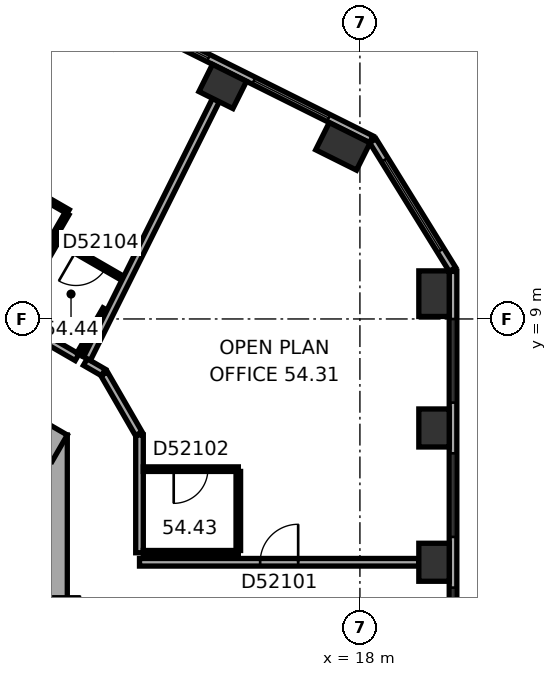
"""IFC4 building model, lengths in metres.
Left out: names, types, materials, properties, quantities, classifications, styles, units other than length and angle.
Written with IfcOpenShell. Run it as: python <this file> out.ifc"""

import sys

from ifc_helpers import new_model, si_unit, direction, frame, frame_2d, origin, origin_2d, place, context, subcontext, project, spatial, rectangle, extrude, element, fill, save


model = new_model("IFC4")
c1 = context("Model", 3, precision=1e-05, world=origin(), true_north=direction((0.0, 1.0)))
c2 = subcontext(c1, "Body", "Model", "MODEL_VIEW")
j1 = project(units=[si_unit("LENGTHUNIT", "METRE"), si_unit("PLANEANGLEUNIT", "RADIAN")], contexts=[c1])
p1 = place(None, origin())
s1 = spatial("IfcSite", under=j1, at=p1, CompositionType="ELEMENT")
p2 = place(p1, origin())
s2 = spatial("IfcBuilding", under=s1, at=p2, CompositionType="ELEMENT")
p3 = place(p2, frame((0.0, 0.0, 221.7)))
s3 = spatial("IfcBuildingStorey", under=s2, at=p3, CompositionType="ELEMENT", Elevation=221.7)
for number, where, z_axis, x_axis in (
    (1, (19.95, 2.598, 0.0), (0.0, 0.0, 1.0), (0.0, 1.0, 0.0)),
    (2, (19.95, 6.132, 0.0), (0.0, 0.0, 1.0), (0.0, 1.0, 0.0)),
):
    element("IfcColumn", number, at=place(p3, frame(where, z_axis=z_axis, x_axis=x_axis)), inside=s3, PredefinedType="COLUMN", context=c2, shape_type="SweptSolid", body=[
        extrude(rectangle(XDim=1.0, YDim=0.8, at=origin_2d()), origin(), (0.0, 0.0, 1.0), 3.7),
    ])
for number, where, z_axis, x_axis in (
    (3, (19.95, 9.665, 0.0), (0.0, 0.0, 1.0), (0.0, 1.0, 0.0)),
    (4, (17.552, 13.541, 0.0), (0.0, 0.0, 1.0), (-0.895, 0.446, 0.0)),
):
    element("IfcColumn", number, at=place(p3, frame(where, z_axis=z_axis, x_axis=x_axis)), inside=s3, PredefinedType="COLUMN", context=c2, shape_type="SweptSolid", body=[
        extrude(rectangle(XDim=1.2, YDim=0.8, at=origin_2d()), origin(), (0.0, 0.0, 1.0), 3.7),
    ])
p4 = place(p3, frame((14.389, 15.118, 0.0), z_axis=(0.0, 0.0, 1.0), x_axis=(-0.894934361602, 0.44619781311, 0.0)))
e5 = element("IfcColumn", 5, at=p4, inside=s3, PredefinedType="COLUMN", context=c2, shape_type="SweptSolid", body=[
    extrude(rectangle(XDim=1.0, YDim=0.8, at=origin_2d()), origin(), (0.0, 0.0, 1.0), 3.7),
])
p5 = place(p3, frame((9.9, -5.947, 0.0), z_axis=(0.0, 0.0, 1.0), x_axis=(0.0, 1.0, 0.0)))
e6 = element("IfcWall", 6, at=p5, inside=s3, PredefinedType="SHEAR", context=c2, shape_type="SweptSolid", body=[
    extrude(rectangle(XDim=11.894, YDim=0.8, at=frame_2d((5.947, 0.0))), origin(), (0.0, 0.0, 1.0), 3.7),
])
p6 = place(p5, frame((6.147, 0.0, 0.0)))
e7 = element("IfcOpeningElement", 7, at=p6, cuts=e6, PredefinedType="OPENING", context=c2, shape_type="SweptSolid", body=[
    extrude(rectangle(XDim=1.5, YDim=2.1, at=frame_2d((0.75, 1.05))), frame((0.0, 0.41, 0.0), z_axis=(0.0, -1.0, 0.0), x_axis=(1.0, 0.0, 0.0)), (0.0, 0.0, 1.0), 0.82),
])
p7 = place(p5, frame((2.997, 0.0, 0.0)))
e8 = element("IfcOpeningElement", 8, at=p7, cuts=e6, PredefinedType="OPENING", context=c2, shape_type="SweptSolid", body=[
    extrude(rectangle(XDim=0.9, YDim=2.1, at=frame_2d((0.45, 1.05))), frame((0.0, 0.41, 0.0), z_axis=(0.0, -1.0, 0.0), x_axis=(1.0, 0.0, 0.0)), (0.0, 0.0, 1.0), 0.82),
])
p8 = place(p3, frame((10.1, 5.6, 0.0), z_axis=(0.0, 0.0, 1.0), x_axis=(-0.866023897231, 0.500002609418, 0.0)))
e9 = element("IfcWall", 9, at=p8, inside=s3, PredefinedType="SHEAR", context=c2, shape_type="SweptSolid", body=[
    extrude(rectangle(XDim=11.894, YDim=0.8, at=frame_2d((5.947, 0.0))), origin(), (0.0, 0.0, 1.0), 3.7),
])
p9 = place(p8, frame((3.897, 0.0, 0.0)))
e10 = element("IfcOpeningElement", 10, at=p9, cuts=e9, PredefinedType="OPENING", context=c2, shape_type="SweptSolid", body=[
    extrude(rectangle(XDim=0.9, YDim=2.1, at=frame_2d((0.45, 1.05))), frame((0.0, 0.41, 0.0), z_axis=(0.0, -1.0, 0.0), x_axis=(1.0, 0.0, 0.0)), (0.0, 0.0, 1.0), 0.82),
])
p10 = place(p8, frame((7.797, 0.0, 0.0)))
e11 = element("IfcOpeningElement", 11, at=p10, cuts=e9, PredefinedType="OPENING", context=c2, shape_type="SweptSolid", body=[
    extrude(rectangle(XDim=0.9, YDim=2.1, at=frame_2d((0.45, 1.05))), frame((0.0, 0.41, 0.0), z_axis=(0.0, -1.0, 0.0), x_axis=(1.0, 0.0, 0.0)), (0.0, 0.0, 1.0), 0.82),
])
p11 = place(p3, frame((20.45, -8.59, 0.0), z_axis=(0.0, 0.0, 1.0), x_axis=(0.0, 1.0, 0.0)))
e12 = element("IfcWall", 12, at=p11, inside=s3, PredefinedType="STANDARD", context=c2, shape_type="SweptSolid", body=[
    extrude(rectangle(XDim=18.841, YDim=0.2, at=frame_2d((9.421, 0.0))), origin(), (0.0, 0.0, 1.0), 3.7),
])
p12 = place(p11, frame((1.254, 0.0, 0.9)))
e13 = element("IfcOpeningElement", 13, at=p12, cuts=e12, PredefinedType="OPENING", context=c2, shape_type="SweptSolid", body=[
    extrude(rectangle(XDim=2.2, YDim=2.0, at=frame_2d((1.1, 1.0))), frame((0.0, 0.11, 0.0), z_axis=(0.0, -1.0, 0.0), x_axis=(1.0, 0.0, 0.0)), (0.0, 0.0, 1.0), 0.22),
])
p13 = place(p11, frame((4.788, 0.0, 0.9)))
e14 = element("IfcOpeningElement", 14, at=p13, cuts=e12, PredefinedType="OPENING", context=c2, shape_type="SweptSolid", body=[
    extrude(rectangle(XDim=2.2, YDim=2.0, at=frame_2d((1.1, 1.0))), frame((0.0, 0.11, 0.0), z_axis=(0.0, -1.0, 0.0), x_axis=(1.0, 0.0, 0.0)), (0.0, 0.0, 1.0), 0.22),
])
p14 = place(p11, frame((8.322, 0.0, 0.9)))
e15 = element("IfcOpeningElement", 15, at=p14, cuts=e12, PredefinedType="OPENING", context=c2, shape_type="SweptSolid", body=[
    extrude(rectangle(XDim=2.2, YDim=2.0, at=frame_2d((1.1, 1.0))), frame((0.0, 0.11, 0.0), z_axis=(0.0, -1.0, 0.0), x_axis=(1.0, 0.0, 0.0)), (0.0, 0.0, 1.0), 0.22),
])
p15 = place(p11, frame((11.855, 0.0, 0.9)))
e16 = element("IfcOpeningElement", 16, at=p15, cuts=e12, PredefinedType="OPENING", context=c2, shape_type="SweptSolid", body=[
    extrude(rectangle(XDim=2.2, YDim=2.0, at=frame_2d((1.1, 1.0))), frame((0.0, 0.11, 0.0), z_axis=(0.0, -1.0, 0.0), x_axis=(1.0, 0.0, 0.0)), (0.0, 0.0, 1.0), 0.22),
])
p16 = place(p11, frame((15.389, 0.0, 0.9)))
e17 = element("IfcOpeningElement", 17, at=p16, cuts=e12, PredefinedType="OPENING", context=c2, shape_type="SweptSolid", body=[
    extrude(rectangle(XDim=2.2, YDim=2.0, at=frame_2d((1.1, 1.0))), frame((0.0, 0.11, 0.0), z_axis=(0.0, -1.0, 0.0), x_axis=(1.0, 0.0, 0.0)), (0.0, 0.0, 1.0), 0.22),
])
p17 = place(p3, frame((20.435, 10.304, 0.0), z_axis=(0.0, 0.0, 1.0), x_axis=(-0.526202661606, 0.850359194058, 0.0)))
e18 = element("IfcWall", 18, at=p17, inside=s3, PredefinedType="STANDARD", context=c2, shape_type="SweptSolid", body=[
    extrude(rectangle(XDim=3.983, YDim=0.2, at=frame_2d((1.991, 0.0))), origin(), (0.0, 0.0, 1.0), 3.7),
])
p18 = place(p17, frame((0.591, 0.0, 0.9)))
e19 = element("IfcOpeningElement", 19, at=p18, cuts=e18, PredefinedType="OPENING", context=c2, shape_type="SweptSolid", body=[
    extrude(rectangle(XDim=2.8, YDim=2.0, at=frame_2d((1.4, 1.0))), frame((0.0, 0.11, 0.0), z_axis=(0.0, -1.0, 0.0), x_axis=(1.0, 0.0, 0.0)), (0.0, 0.0, 1.0), 0.22),
])
p19 = place(p3, frame((18.299, 13.727, 0.0), z_axis=(0.0, 0.0, 1.0), x_axis=(-0.894934554817, 0.44619742558, 0.0)))
e20 = element("IfcWall", 20, at=p19, inside=s3, PredefinedType="STANDARD", context=c2, shape_type="SweptSolid", body=[
    extrude(rectangle(XDim=18.841, YDim=0.2, at=frame_2d((9.421, 0.0))), origin(), (0.0, 0.0, 1.0), 3.7),
])
p20 = place(p19, frame((1.253, 0.0, 0.9)))
e21 = element("IfcOpeningElement", 21, at=p20, cuts=e20, PredefinedType="OPENING", context=c2, shape_type="SweptSolid", body=[
    extrude(rectangle(XDim=2.2, YDim=2.0, at=frame_2d((1.1, 1.0))), frame((0.0, 0.11, 0.0), z_axis=(0.0, -1.0, 0.0), x_axis=(1.0, 0.0, 0.0)), (0.0, 0.0, 1.0), 0.22),
])
p21 = place(p19, frame((4.786, 0.0, 0.9)))
e22 = element("IfcOpeningElement", 22, at=p21, cuts=e20, PredefinedType="OPENING", context=c2, shape_type="SweptSolid", body=[
    extrude(rectangle(XDim=2.2, YDim=2.0, at=frame_2d((1.1, 1.0))), frame((0.0, 0.11, 0.0), z_axis=(0.0, -1.0, 0.0), x_axis=(1.0, 0.0, 0.0)), (0.0, 0.0, 1.0), 0.22),
])
p22 = place(p19, frame((8.32, 0.0, 0.9)))
e23 = element("IfcOpeningElement", 23, at=p22, cuts=e20, PredefinedType="OPENING", context=c2, shape_type="SweptSolid", body=[
    extrude(rectangle(XDim=2.2, YDim=2.0, at=frame_2d((1.1, 1.0))), frame((0.0, 0.11, 0.0), z_axis=(0.0, -1.0, 0.0), x_axis=(1.0, 0.0, 0.0)), (0.0, 0.0, 1.0), 0.22),
])
p23 = place(p19, frame((11.854, 0.0, 0.9)))
e24 = element("IfcOpeningElement", 24, at=p23, cuts=e20, PredefinedType="OPENING", context=c2, shape_type="SweptSolid", body=[
    extrude(rectangle(XDim=2.2, YDim=2.0, at=frame_2d((1.1, 1.0))), frame((0.0, 0.11, 0.0), z_axis=(0.0, -1.0, 0.0), x_axis=(1.0, 0.0, 0.0)), (0.0, 0.0, 1.0), 0.22),
])
p24 = place(p19, frame((15.387, 0.0, 0.9)))
e25 = element("IfcOpeningElement", 25, at=p24, cuts=e20, PredefinedType="OPENING", context=c2, shape_type="SweptSolid", body=[
    extrude(rectangle(XDim=2.2, YDim=2.0, at=frame_2d((1.1, 1.0))), frame((0.0, 0.11, 0.0), z_axis=(0.0, -1.0, 0.0), x_axis=(1.0, 0.0, 0.0)), (0.0, 0.0, 1.0), 0.22),
])
p25 = place(p3, frame((7.948, 13.193, 0.0), z_axis=(0.0, 0.0, 1.0), x_axis=(0.866019409031, -0.500010383074, 0.0)))
e26 = element("IfcWall", 26, at=p25, inside=s3, PredefinedType="PARTITIONING", context=c2, shape_type="SweptSolid", body=[
    extrude(rectangle(XDim=2.74, YDim=0.12, at=frame_2d((1.37, 0.0))), origin(), (0.0, 0.0, 1.0), 3.42),
])
p26 = place(p3, frame((8.875, 9.079, 0.0), z_axis=(0.0, 0.0, 1.0), x_axis=(0.499998129301, 0.86602648383, 0.0)))
e27 = element("IfcWall", 27, at=p26, inside=s3, PredefinedType="PARTITIONING", context=c2, shape_type="SweptSolid", body=[
    extrude(rectangle(XDim=2.3, YDim=0.12, at=frame_2d((1.15, 0.0))), origin(), (0.0, 0.0, 1.0), 3.42),
])
p27 = place(p3, frame((10.077, 11.04, 0.0), z_axis=(0.0, 0.0, 1.0), x_axis=(0.866043088465, -0.499969367985, 0.0)))
e28 = element("IfcWall", 28, at=p27, inside=s3, PredefinedType="PARTITIONING", context=c2, shape_type="SweptSolid", body=[
    extrude(rectangle(XDim=1.94, YDim=0.12, at=frame_2d((0.97, 0.0))), origin(), (0.0, 0.0, 1.0), 3.42),
])
p28 = place(p27, frame((0.52, 0.0, 0.0)))
e29 = element("IfcOpeningElement", 29, at=p28, cuts=e28, PredefinedType="OPENING", context=c2, shape_type="SweptSolid", body=[
    extrude(rectangle(XDim=0.9, YDim=2.1, at=frame_2d((0.45, 1.05))), frame((0.0, 0.07, 0.0), z_axis=(0.0, -1.0, 0.0), x_axis=(1.0, 0.0, 0.0)), (0.0, 0.0, 1.0), 0.14),
])
p29 = place(p3, frame((10.292, 11.771, 0.0), z_axis=(0.0, 0.0, 1.0), x_axis=(-0.500026023896, -0.86601037836, 0.0)))
e30 = element("IfcWall", 30, at=p29, inside=s3, PredefinedType="PARTITIONING", context=c2, shape_type="SweptSolid", body=[
    extrude(rectangle(XDim=3.04, YDim=0.12, at=frame_2d((1.52, 0.0))), origin(), (0.0, 0.0, 1.0), 3.42),
])
p30 = place(p3, frame((10.558, 7.992, 0.0), z_axis=(0.0, 0.0, 1.0), x_axis=(-0.866041268327, 0.499972520799, 0.0)))
e31 = element("IfcWall", 31, at=p30, inside=s3, PredefinedType="PARTITIONING", context=c2, shape_type="SweptSolid", body=[
    extrude(rectangle(XDim=2.0, YDim=0.2, at=frame_2d((1.0, 0.0))), origin(), (0.0, 0.0, 1.0), 3.42),
])
p31 = place(p3, frame((11.25, 7.592, 0.0), z_axis=(0.0, 0.0, 1.0), x_axis=(-0.865993292597, 0.500055614084, 0.0)))
e32 = element("IfcWall", 32, at=p31, inside=s3, PredefinedType="PARTITIONING", context=c2, shape_type="SweptSolid", body=[
    extrude(rectangle(XDim=0.55, YDim=0.2, at=frame_2d((0.275, 0.0))), origin(), (0.0, 0.0, 1.0), 3.42),
])
p32 = place(p3, frame((11.291, 9.263, 0.0), z_axis=(0.0, 0.0, 1.0), x_axis=(-0.500036664704, -0.866004234373, 0.0)))
e33 = element("IfcWall", 33, at=p32, inside=s3, PredefinedType="PARTITIONING", context=c2, shape_type="SweptSolid", body=[
    extrude(rectangle(XDim=1.368, YDim=0.12, at=frame_2d((0.684, 0.0))), origin(), (0.0, 0.0, 1.0), 3.42),
])
p33 = place(p3, frame((12.18, 5.981, 0.0), z_axis=(0.0, 0.0, 1.0), x_axis=(-0.499904359745, 0.86608061467, 0.0)))
e34 = element("IfcWall", 34, at=p33, inside=s3, PredefinedType="PARTITIONING", context=c2, shape_type="SweptSolid", body=[
    extrude(rectangle(XDim=1.82, YDim=0.2, at=frame_2d((0.91, 0.0))), origin(), (0.0, 0.0, 1.0), 3.42),
])
p34 = place(p3, frame((12.2, 2.848, 0.0), z_axis=(0.0, 0.0, 1.0), x_axis=(0.0, 1.0, 0.0)))
e35 = element("IfcWall", 35, at=p34, inside=s3, PredefinedType="PARTITIONING", context=c2, shape_type="SweptSolid", body=[
    extrude(rectangle(XDim=3.099, YDim=0.2, at=frame_2d((1.549, 0.0))), origin(), (0.0, 0.0, 1.0), 3.42),
])
p35 = place(p3, frame((12.3, 5.048, 0.0), z_axis=(0.0, 0.0, 1.0), x_axis=(1.0, 0.0, 0.0)))
e36 = element("IfcWall", 36, at=p35, inside=s3, PredefinedType="PARTITIONING", context=c2, shape_type="SweptSolid", body=[
    extrude(rectangle(XDim=2.5, YDim=0.12, at=frame_2d((1.25, 0.0))), origin(), (0.0, 0.0, 1.0), 3.42),
])
p36 = place(p35, frame((0.8, 0.0, 0.0)))
e37 = element("IfcOpeningElement", 37, at=p36, cuts=e36, PredefinedType="OPENING", context=c2, shape_type="SweptSolid", body=[
    extrude(rectangle(XDim=0.9, YDim=2.1, at=frame_2d((0.45, 1.05))), frame((0.0, 0.07, 0.0), z_axis=(0.0, -1.0, 0.0), x_axis=(1.0, 0.0, 0.0)), (0.0, 0.0, 1.0), 0.14),
])
p37 = place(p3, frame((14.211, 14.76, 0.0), z_axis=(0.0, 0.0, 1.0), x_axis=(-0.446198490295, -0.89493402397, 0.0)))
e38 = element("IfcWall", 38, at=p37, inside=s3, PredefinedType="PARTITIONING", context=c2, shape_type="SweptSolid", body=[
    extrude(rectangle(XDim=7.602, YDim=0.2, at=frame_2d((3.801, 0.0))), origin(), (0.0, 0.0, 1.0), 3.42),
])
p38 = place(p3, frame((14.8, 2.848, 0.0), z_axis=(0.0, 0.0, 1.0), x_axis=(-1.0, 0.0, 0.0)))
e39 = element("IfcWall", 39, at=p38, inside=s3, PredefinedType="PARTITIONING", context=c2, shape_type="SweptSolid", body=[
    extrude(rectangle(XDim=2.5, YDim=0.12, at=frame_2d((1.25, 0.0))), origin(), (0.0, 0.0, 1.0), 3.42),
])
p39 = place(p3, frame((14.8, 4.988, 0.0), z_axis=(0.0, 0.0, 1.0), x_axis=(0.0, -1.0, 0.0)))
e40 = element("IfcWall", 40, at=p39, inside=s3, PredefinedType="PARTITIONING", context=c2, shape_type="SweptSolid", body=[
    extrude(rectangle(XDim=2.08, YDim=0.12, at=frame_2d((1.04, 0.0))), origin(), (0.0, 0.0, 1.0), 3.42),
])
p40 = place(p3, frame((19.55, 2.598, 0.0), z_axis=(0.0, 0.0, 1.0), x_axis=(-1.0, 0.0, 0.0)))
e41 = element("IfcWall", 41, at=p40, inside=s3, PredefinedType="PARTITIONING", context=c2, shape_type="SweptSolid", body=[
    extrude(rectangle(XDim=7.35, YDim=0.2, at=frame_2d((3.675, 0.0))), origin(), (0.0, 0.0, 1.0), 3.42),
])
p41 = place(p40, frame((3.175, 0.0, 0.0)))
e42 = element("IfcOpeningElement", 42, at=p41, cuts=e41, PredefinedType="OPENING", context=c2, shape_type="SweptSolid", body=[
    extrude(rectangle(XDim=1.0, YDim=2.1, at=frame_2d((0.5, 1.05))), frame((0.0, 0.11, 0.0), z_axis=(0.0, -1.0, 0.0), x_axis=(1.0, 0.0, 0.0)), (0.0, 0.0, 1.0), 0.22),
])
p42 = place(p14, origin())
e43 = element("IfcWindow", 43, at=p42, inside=s3, PartitioningType="SINGLE_PANEL", PredefinedType="WINDOW", context=c2, shape_type="SweptSolid", body=[
    extrude(rectangle(XDim=2.2, YDim=2.0, at=frame_2d((1.1, 1.0))), frame((0.0, 0.03, 0.0), z_axis=(0.0, -1.0, 0.0), x_axis=(1.0, 0.0, 0.0)), (0.0, 0.0, 1.0), 0.06),
])
fill(e15, e43)
p43 = place(p15, origin())
e44 = element("IfcWindow", 44, at=p43, inside=s3, PartitioningType="SINGLE_PANEL", PredefinedType="WINDOW", context=c2, shape_type="SweptSolid", body=[
    extrude(rectangle(XDim=2.2, YDim=2.0, at=frame_2d((1.1, 1.0))), frame((0.0, 0.03, 0.0), z_axis=(0.0, -1.0, 0.0), x_axis=(1.0, 0.0, 0.0)), (0.0, 0.0, 1.0), 0.06),
])
fill(e16, e44)
p44 = place(p16, origin())
e45 = element("IfcWindow", 45, at=p44, inside=s3, PartitioningType="SINGLE_PANEL", PredefinedType="WINDOW", context=c2, shape_type="SweptSolid", body=[
    extrude(rectangle(XDim=2.2, YDim=2.0, at=frame_2d((1.1, 1.0))), frame((0.0, 0.03, 0.0), z_axis=(0.0, -1.0, 0.0), x_axis=(1.0, 0.0, 0.0)), (0.0, 0.0, 1.0), 0.06),
])
fill(e17, e45)
p45 = place(p18, origin())
e46 = element("IfcWindow", 46, at=p45, inside=s3, PartitioningType="SINGLE_PANEL", PredefinedType="WINDOW", context=c2, shape_type="SweptSolid", body=[
    extrude(rectangle(XDim=2.8, YDim=2.0, at=frame_2d((1.4, 1.0))), frame((0.0, 0.03, 0.0), z_axis=(0.0, -1.0, 0.0), x_axis=(1.0, 0.0, 0.0)), (0.0, 0.0, 1.0), 0.06),
])
fill(e19, e46)
p46 = place(p20, origin())
e47 = element("IfcWindow", 47, at=p46, inside=s3, PartitioningType="SINGLE_PANEL", PredefinedType="WINDOW", context=c2, shape_type="SweptSolid", body=[
    extrude(rectangle(XDim=2.2, YDim=2.0, at=frame_2d((1.1, 1.0))), frame((0.0, 0.03, 0.0), z_axis=(0.0, -1.0, 0.0), x_axis=(1.0, 0.0, 0.0)), (0.0, 0.0, 1.0), 0.06),
])
fill(e21, e47)
p47 = place(p21, origin())
e48 = element("IfcWindow", 48, at=p47, inside=s3, PartitioningType="SINGLE_PANEL", PredefinedType="WINDOW", context=c2, shape_type="SweptSolid", body=[
    extrude(rectangle(XDim=2.2, YDim=2.0, at=frame_2d((1.1, 1.0))), frame((0.0, 0.03, 0.0), z_axis=(0.0, -1.0, 0.0), x_axis=(1.0, 0.0, 0.0)), (0.0, 0.0, 1.0), 0.06),
])
fill(e22, e48)
p48 = place(p6, origin())
e49 = element("IfcDoor", 49, at=p48, inside=s3, OperationType="DOUBLE_DOOR_SINGLE_SWING", PredefinedType="DOOR", context=c2, shape_type="SweptSolid", body=[
    extrude(rectangle(XDim=1.5, YDim=2.1, at=frame_2d((0.75, 1.05))), frame((0.0, 0.025, 0.0), z_axis=(0.0, -1.0, 0.0), x_axis=(1.0, 0.0, 0.0)), (0.0, 0.0, 1.0), 0.05),
])
fill(e7, e49)
p49 = place(p41, origin())
e50 = element("IfcDoor", 50, at=p49, inside=s3, OperationType="SINGLE_SWING_LEFT", PredefinedType="DOOR", context=c2, shape_type="SweptSolid", body=[
    extrude(rectangle(XDim=1.0, YDim=2.1, at=frame_2d((0.5, 1.05))), frame((0.0, 0.025, 0.0), z_axis=(0.0, -1.0, 0.0), x_axis=(1.0, 0.0, 0.0)), (0.0, 0.0, 1.0), 0.05),
])
fill(e42, e50)
p50 = place(p36, origin())
e51 = element("IfcDoor", 51, at=p50, inside=s3, OperationType="SINGLE_SWING_LEFT", PredefinedType="DOOR", context=c2, shape_type="SweptSolid", body=[
    extrude(rectangle(XDim=0.9, YDim=2.1, at=frame_2d((0.45, 1.05))), frame((0.0, 0.025, 0.0), z_axis=(0.0, -1.0, 0.0), x_axis=(1.0, 0.0, 0.0)), (0.0, 0.0, 1.0), 0.05),
])
fill(e37, e51)
p51 = place(p28, origin())
e52 = element("IfcDoor", 52, at=p51, inside=s3, OperationType="SINGLE_SWING_LEFT", PredefinedType="DOOR", context=c2, shape_type="SweptSolid", body=[
    extrude(rectangle(XDim=0.9, YDim=2.1, at=frame_2d((0.45, 1.05))), frame((0.0, 0.025, 0.0), z_axis=(0.0, -1.0, 0.0), x_axis=(1.0, 0.0, 0.0)), (0.0, 0.0, 1.0), 0.05),
])
fill(e29, e52)
save(model, sys.argv[1])
